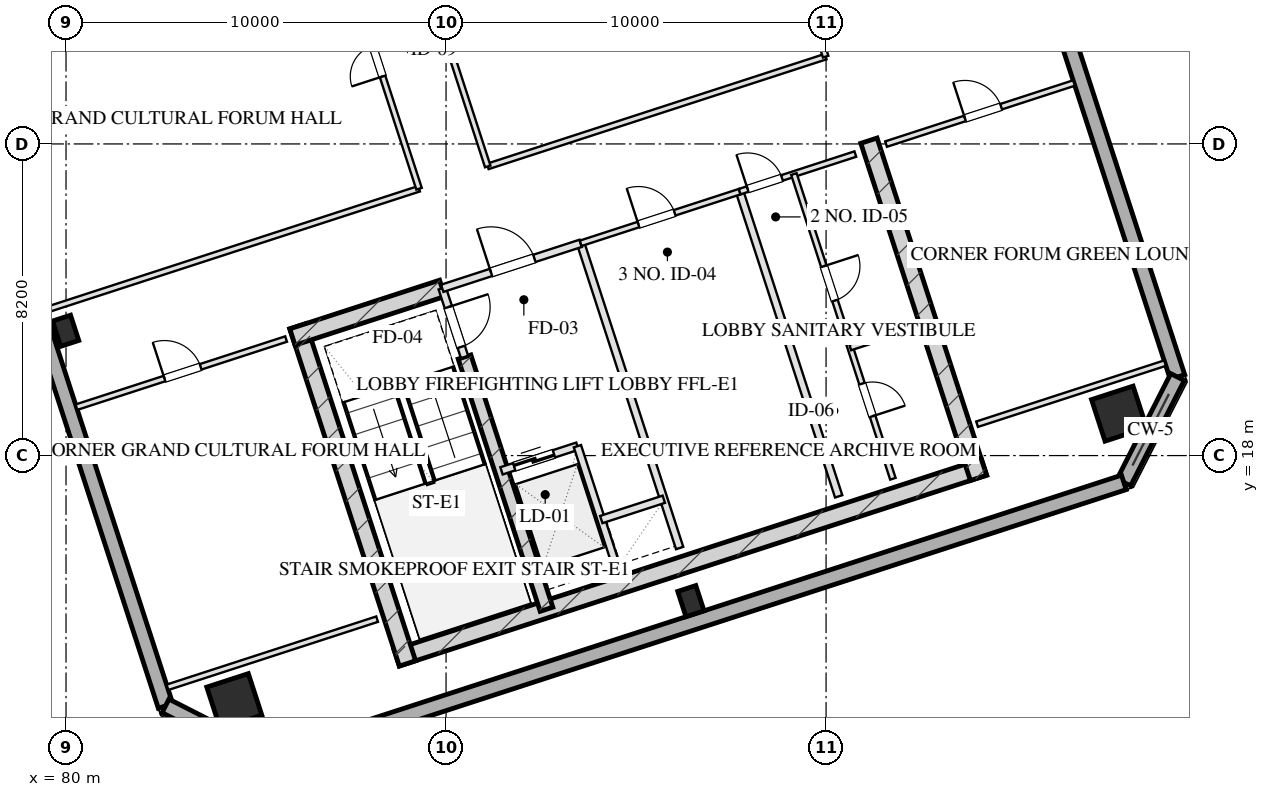
"""IFC4 building model, lengths in metres.
Left out: names, types, materials, properties, quantities, classifications, styles, units other than length and angle.
Written with IfcOpenShell. Run it as: python <this file> out.ifc"""

import sys

from ifc_helpers import new_model, si_unit, direction, frame, frame_2d, origin, origin_2d, place, context, subcontext, project, spatial, rectangle, hollow_rectangle, extrude, element, fill, save


model = new_model("IFC4")
c1 = context("Model", 3, precision=1e-05, world=origin(), true_north=direction((0.0, 1.0)))
c2 = subcontext(c1, "Body", "Model", "MODEL_VIEW")
j1 = project(units=[si_unit("LENGTHUNIT", "METRE"), si_unit("PLANEANGLEUNIT", "RADIAN")], contexts=[c1])
p1 = place(None, origin())
s1 = spatial("IfcSite", under=j1, at=p1, CompositionType="ELEMENT")
p2 = place(p1, origin())
s2 = spatial("IfcBuilding", under=s1, at=p2, CompositionType="ELEMENT")
p3 = place(p2, frame((0.0, 0.0, 202.4)))
s3 = spatial("IfcBuildingStorey", under=s2, at=p3, CompositionType="ELEMENT", Elevation=202.4)
p4 = place(p3, frame((88.701, 12.675, 0.0), z_axis=(0.0, 0.0, 1.0), x_axis=(0.95105824505, 0.309011673763, 0.0)))
e1 = element("IfcWall", 1, at=p4, inside=s3, PredefinedType="SHEAR", context=c2, shape_type="SweptSolid", body=[
    extrude(rectangle(XDim=16.25, YDim=0.45, at=frame_2d((8.125, 0.0))), origin(), (0.0, 0.0, 1.0), 3.45),
])
for number, where, z_axis, x_axis in (
    (2, (86.102, 21.404, 0.0), (0.0, 0.0, 1.0), (0.309, -0.951, 0.0)),
    (3, (101.128, 26.286, 0.0), (0.0, 0.0, 1.0), (0.309, -0.951, 0.0)),
):
    element("IfcWall", number, at=place(p3, frame(where, z_axis=z_axis, x_axis=x_axis)), inside=s3, PredefinedType="SHEAR", context=c2, shape_type="SweptSolid", body=[
        extrude(rectangle(XDim=9.33, YDim=0.45, at=frame_2d((4.665, 0.0))), origin(), (0.0, 0.0, 1.0), 3.45),
    ])
p5 = place(p3, frame((90.486, 20.594, 0.0), z_axis=(0.0, 0.0, 1.0), x_axis=(0.309020428229, -0.951055400562, 0.0)))
e4 = element("IfcWall", 4, at=p5, inside=s3, PredefinedType="SHEAR", context=c2, shape_type="SweptSolid", body=[
    extrude(rectangle(XDim=6.98, YDim=0.35, at=frame_2d((3.49, 0.0))), origin(), (0.0, 0.0, 1.0), 3.45),
])
p6 = place(p3, frame((85.957, 21.12, 0.0), z_axis=(0.0, 0.0, 1.0), x_axis=(0.951064796122, 0.308991510526, 0.0)))
e5 = element("IfcWall", 5, at=p6, inside=s3, PredefinedType="SHEAR", context=c2, shape_type="SweptSolid", body=[
    extrude(rectangle(XDim=4.145, YDim=0.45, at=frame_2d((2.073, 0.0))), origin(), (0.0, 0.0, 1.0), 3.45),
])
for number, where, z_axis, x_axis in (
    (6, (84.428, 11.539, 0.0), (0.0, 0.0, 1.0), (0.951, 0.309, 0.0)),
    (7, (107.71, 19.104, 0.0), (0.0, 0.0, 1.0), (0.951, 0.309, 0.0)),
):
    element("IfcColumn", number, at=place(p3, frame(where, z_axis=z_axis, x_axis=x_axis)), inside=s3, PredefinedType="COLUMN", context=c2, shape_type="SweptSolid", body=[
        extrude(hollow_rectangle(XDim=1.15, YDim=1.15, WallThickness=0.04, at=origin_2d()), origin(), (0.0, 0.0, 1.0), 3.451),
    ])
for number, where, z_axis, x_axis in (
    (8, (79.99, 21.284, 0.0), (0.0, 0.0, 1.0), (0.951, 0.309, 0.0)),
    (9, (96.443, 14.17, 0.0), (0.0, 0.0, 1.0), (0.951, 0.309, 0.0)),
):
    element("IfcColumn", number, at=place(p3, frame(where, z_axis=z_axis, x_axis=x_axis)), inside=s3, PredefinedType="COLUMN", context=c2, shape_type="SweptSolid", body=[
        extrude(hollow_rectangle(XDim=0.5, YDim=0.7, WallThickness=0.025, at=origin_2d()), origin(), (0.0, 0.0, 1.0), 3.451),
    ])
p7 = place(p3, frame((82.618, 11.414, 0.0), z_axis=(0.0, 0.0, 1.0), x_axis=(-0.309016491071, 0.951056679828, 0.0)))
e10 = element("IfcWall", 10, at=p7, inside=s3, PredefinedType="SOLIDWALL", context=c2, shape_type="SweptSolid", body=[
    extrude(rectangle(XDim=38.4, YDim=0.4, at=frame_2d((19.2, 0.0))), origin(), (0.0, 0.0, 1.0), 2.61),
])
p8 = place(p7, frame((11.75, 0.0, 0.75)))
e11 = element("IfcOpeningElement", 11, at=p8, cuts=e10, PredefinedType="OPENING", context=c2, shape_type="SweptSolid", body=[
    extrude(rectangle(XDim=2.1, YDim=1.46, at=frame_2d((1.05, 0.73))), frame((0.0, 0.21, 0.0), z_axis=(0.0, -1.0, 0.0), x_axis=(1.0, 0.0, 0.0)), (0.0, 0.0, 1.0), 0.42),
])
p9 = place(p7, frame((15.55, 0.0, 0.75)))
e12 = element("IfcOpeningElement", 12, at=p9, cuts=e10, PredefinedType="OPENING", context=c2, shape_type="SweptSolid", body=[
    extrude(rectangle(XDim=2.1, YDim=1.46, at=frame_2d((1.05, 0.73))), frame((0.0, 0.21, 0.0), z_axis=(0.0, -1.0, 0.0), x_axis=(1.0, 0.0, 0.0)), (0.0, 0.0, 1.0), 0.42),
])
p10 = place(p7, frame((20.75, 0.0, 0.75)))
e13 = element("IfcOpeningElement", 13, at=p10, cuts=e10, PredefinedType="OPENING", context=c2, shape_type="SweptSolid", body=[
    extrude(rectangle(XDim=2.1, YDim=1.46, at=frame_2d((1.05, 0.73))), frame((0.0, 0.21, 0.0), z_axis=(0.0, -1.0, 0.0), x_axis=(1.0, 0.0, 0.0)), (0.0, 0.0, 1.0), 0.42),
])
p11 = place(p7, frame((24.55, 0.0, 0.75)))
e14 = element("IfcOpeningElement", 14, at=p11, cuts=e10, PredefinedType="OPENING", context=c2, shape_type="SweptSolid", body=[
    extrude(rectangle(XDim=2.1, YDim=1.46, at=frame_2d((1.05, 0.73))), frame((0.0, 0.21, 0.0), z_axis=(0.0, -1.0, 0.0), x_axis=(1.0, 0.0, 0.0)), (0.0, 0.0, 1.0), 0.42),
])
p12 = place(p3, frame((97.382, 56.586, 0.0), z_axis=(0.0, 0.0, 1.0), x_axis=(0.309016491071, -0.951056679828, 0.0)))
e15 = element("IfcWall", 15, at=p12, inside=s3, PredefinedType="SOLIDWALL", context=c2, shape_type="SweptSolid", body=[
    extrude(rectangle(XDim=38.4, YDim=0.4, at=frame_2d((19.2, 0.0))), origin(), (0.0, 0.0, 1.0), 2.61),
])
p13 = place(p12, frame((24.55, 0.0, 0.75)))
e16 = element("IfcOpeningElement", 16, at=p13, cuts=e15, PredefinedType="OPENING", context=c2, shape_type="SweptSolid", body=[
    extrude(rectangle(XDim=2.1, YDim=1.46, at=frame_2d((1.05, 0.73))), frame((0.0, 0.21, 0.0), z_axis=(0.0, -1.0, 0.0), x_axis=(1.0, 0.0, 0.0)), (0.0, 0.0, 1.0), 0.42),
])
p14 = place(p12, frame((20.75, 0.0, 0.75)))
e17 = element("IfcOpeningElement", 17, at=p14, cuts=e15, PredefinedType="OPENING", context=c2, shape_type="SweptSolid", body=[
    extrude(rectangle(XDim=2.1, YDim=1.46, at=frame_2d((1.05, 0.73))), frame((0.0, 0.21, 0.0), z_axis=(0.0, -1.0, 0.0), x_axis=(1.0, 0.0, 0.0)), (0.0, 0.0, 1.0), 0.42),
])
p15 = place(p12, frame((15.55, 0.0, 0.75)))
e18 = element("IfcOpeningElement", 18, at=p15, cuts=e15, PredefinedType="OPENING", context=c2, shape_type="SweptSolid", body=[
    extrude(rectangle(XDim=2.1, YDim=1.46, at=frame_2d((1.05, 0.73))), frame((0.0, 0.21, 0.0), z_axis=(0.0, -1.0, 0.0), x_axis=(1.0, 0.0, 0.0)), (0.0, 0.0, 1.0), 0.42),
])
p16 = place(p12, frame((11.75, 0.0, 0.75)))
e19 = element("IfcOpeningElement", 19, at=p16, cuts=e15, PredefinedType="OPENING", context=c2, shape_type="SweptSolid", body=[
    extrude(rectangle(XDim=2.1, YDim=1.46, at=frame_2d((1.05, 0.73))), frame((0.0, 0.21, 0.0), z_axis=(0.0, -1.0, 0.0), x_axis=(1.0, 0.0, 0.0)), (0.0, 0.0, 1.0), 0.42),
])
p17 = place(p3, frame((109.248, 20.066, 0.0), z_axis=(0.0, 0.0, 1.0), x_axis=(-0.453949291228, -0.891027519774, 0.0)))
e20 = element("IfcWall", 20, at=p17, inside=s3, PredefinedType="SOLIDWALL", context=c2, shape_type="SweptSolid", body=[
    extrude(rectangle(XDim=3.111, YDim=0.4, at=frame_2d((1.556, 0.0))), origin(), (0.0, 0.0, 1.0), 2.61),
])
p18 = place(p3, frame((107.835, 17.294, 0.0), z_axis=(0.0, 0.0, 1.0), x_axis=(-0.951058012937, -0.309012388148, 0.0)))
e21 = element("IfcWall", 21, at=p18, inside=s3, PredefinedType="SOLIDWALL", context=c2, shape_type="SweptSolid", body=[
    extrude(rectangle(XDim=23.6, YDim=0.4, at=frame_2d((11.8, 0.0))), origin(), (0.0, 0.0, 1.0), 2.61),
])
p19 = place(p3, frame((85.39, 10.001, 0.0), z_axis=(0.0, 0.0, 1.0), x_axis=(-0.890979603174, 0.454043331334, 0.0)))
e22 = element("IfcWall", 22, at=p19, inside=s3, PredefinedType="SOLIDWALL", context=c2, shape_type="SweptSolid", body=[
    extrude(rectangle(XDim=3.111, YDim=0.4, at=frame_2d((1.556, 0.0))), origin(), (0.0, 0.0, 1.0), 2.61),
])
p20 = place(p3, frame((89.899, 22.401, 0.0), z_axis=(0.0, 0.0, 1.0), x_axis=(0.308932062672, -0.951084108086, 0.0)))
e23 = element("IfcWall", 23, at=p20, inside=s3, PredefinedType="PARTITIONING", context=c2, shape_type="SweptSolid", body=[
    extrude(rectangle(XDim=1.9, YDim=0.2, at=frame_2d((0.95, 0.0))), origin(), (0.0, 0.0, 1.0), 3.175),
])
p21 = place(p20, frame((0.52, 0.0, 0.0)))
e24 = element("IfcOpeningElement", 24, at=p21, cuts=e23, PredefinedType="OPENING", context=c2, shape_type="SweptSolid", body=[
    extrude(rectangle(XDim=1.1, YDim=2.05, at=frame_2d((0.55, 1.025))), frame((0.0, 0.11, 0.0), z_axis=(0.0, -1.0, 0.0), x_axis=(1.0, 0.0, 0.0)), (0.0, 0.0, 1.0), 0.22),
])
p22 = place(p3, frame((93.542, 23.585, 0.0), z_axis=(0.0, 0.0, 1.0), x_axis=(0.309042196757, -0.951048327176, 0.0)))
e25 = element("IfcWall", 25, at=p22, inside=s3, PredefinedType="PARTITIONING", context=c2, shape_type="SweptSolid", body=[
    extrude(rectangle(XDim=8.43, YDim=0.2, at=frame_2d((4.215, 0.0))), origin(), (0.0, 0.0, 1.0), 3.175),
])
p23 = place(p3, frame((89.899, 22.401, 0.0), z_axis=(0.0, 0.0, 1.0), x_axis=(0.951046716504, 0.309047153403, 0.0)))
e26 = element("IfcWall", 26, at=p23, inside=s3, PredefinedType="PARTITIONING", context=c2, shape_type="SweptSolid", body=[
    extrude(rectangle(XDim=3.83, YDim=0.2, at=frame_2d((1.915, 0.0))), origin(), (0.0, 0.0, 1.0), 3.175),
])
p24 = place(p23, frame((1.35, 0.0, 0.0)))
e27 = element("IfcOpeningElement", 27, at=p24, cuts=e26, PredefinedType="OPENING", context=c2, shape_type="SweptSolid", body=[
    extrude(rectangle(XDim=1.2, YDim=2.05, at=frame_2d((0.6, 1.025))), frame((0.0, 0.11, 0.0), z_axis=(0.0, -1.0, 0.0), x_axis=(1.0, 0.0, 0.0)), (0.0, 0.0, 1.0), 0.22),
])
p25 = place(p3, frame((91.46, 17.598, 0.0), z_axis=(0.0, 0.0, 1.0), x_axis=(0.951062257173, 0.308999325213, 0.0)))
e28 = element("IfcWall", 28, at=p25, inside=s3, PredefinedType="PARTITIONING", context=c2, shape_type="SweptSolid", body=[
    extrude(rectangle(XDim=2.1, YDim=0.2, at=frame_2d((1.05, 0.0))), origin(), (0.0, 0.0, 1.0), 3.175),
])
p26 = place(p25, frame((0.35, 0.0, 0.0)))
e29 = element("IfcOpeningElement", 29, at=p26, cuts=e28, PredefinedType="OPENING", context=c2, shape_type="SweptSolid", body=[
    extrude(rectangle(XDim=1.1, YDim=2.05, at=frame_2d((0.55, 1.025))), frame((0.0, 0.11, 0.0), z_axis=(0.0, -1.0, 0.0), x_axis=(1.0, 0.0, 0.0)), (0.0, 0.0, 1.0), 0.22),
])
p27 = place(p3, frame((93.457, 18.247, 0.0), z_axis=(0.0, 0.0, 1.0), x_axis=(0.3089935693, -0.951064127245, 0.0)))
e30 = element("IfcWall", 30, at=p27, inside=s3, PredefinedType="PARTITIONING", context=c2, shape_type="SweptSolid", body=[
    extrude(rectangle(XDim=3.7, YDim=0.2, at=frame_2d((1.85, 0.0))), origin(), (0.0, 0.0, 1.0), 3.175),
])
p28 = place(p3, frame((94.084, 16.317, 0.0), z_axis=(0.0, 0.0, 1.0), x_axis=(0.951041328149, 0.309063734775, 0.0)))
e31 = element("IfcWall", 31, at=p28, inside=s3, PredefinedType="PARTITIONING", context=c2, shape_type="SweptSolid", body=[
    extrude(rectangle(XDim=1.73, YDim=0.2, at=frame_2d((0.865, 0.0))), origin(), (0.0, 0.0, 1.0), 3.175),
])
p29 = place(p3, frame((97.727, 24.944, 0.0), z_axis=(0.0, 0.0, 1.0), x_axis=(0.309016001439, -0.951056838919, 0.0)))
e32 = element("IfcWall", 32, at=p29, inside=s3, PredefinedType="PARTITIONING", context=c2, shape_type="SweptSolid", body=[
    extrude(rectangle(XDim=8.43, YDim=0.2, at=frame_2d((4.215, 0.0))), origin(), (0.0, 0.0, 1.0), 3.175),
])
p30 = place(p3, frame((93.542, 23.585, 0.0), z_axis=(0.0, 0.0, 1.0), x_axis=(0.951063829732, 0.308994485023, 0.0)))
e33 = element("IfcWall", 33, at=p30, inside=s3, PredefinedType="PARTITIONING", context=c2, shape_type="SweptSolid", body=[
    extrude(rectangle(XDim=4.4, YDim=0.15, at=frame_2d((2.2, 0.0))), origin(), (0.0, 0.0, 1.0), 3.175),
])
p31 = place(p30, frame((1.6, 0.0, 0.0)))
e34 = element("IfcOpeningElement", 34, at=p31, cuts=e33, PredefinedType="OPENING", context=c2, shape_type="SweptSolid", body=[
    extrude(rectangle(XDim=1.0, YDim=2.05, at=frame_2d((0.5, 1.025))), frame((0.0, 0.085, 0.0), z_axis=(0.0, -1.0, 0.0), x_axis=(1.0, 0.0, 0.0)), (0.0, 0.0, 1.0), 0.17),
])
p32 = place(p3, frame((97.727, 24.944, 0.0), z_axis=(0.0, 0.0, 1.0), x_axis=(0.951036872128, 0.309077446369, 0.0)))
e35 = element("IfcWall", 35, at=p32, inside=s3, PredefinedType="PARTITIONING", context=c2, shape_type="SweptSolid", body=[
    extrude(rectangle(XDim=3.2, YDim=0.15, at=frame_2d((1.6, 0.0))), origin(), (0.0, 0.0, 1.0), 3.175),
])
p33 = place(p32, frame((0.22, 0.0, 0.0)))
e36 = element("IfcOpeningElement", 36, at=p33, cuts=e35, PredefinedType="OPENING", context=c2, shape_type="SweptSolid", body=[
    extrude(rectangle(XDim=0.95, YDim=2.05, at=frame_2d((0.475, 1.025))), frame((0.0, 0.085, 0.0), z_axis=(0.0, -1.0, 0.0), x_axis=(1.0, 0.0, 0.0)), (0.0, 0.0, 1.0), 0.17),
])
p34 = place(p3, frame((99.153, 25.408, 0.0), z_axis=(0.0, 0.0, 1.0), x_axis=(0.309016001439, -0.951056838919, 0.0)))
e37 = element("IfcWall", 37, at=p34, inside=s3, PredefinedType="PARTITIONING", context=c2, shape_type="SweptSolid", body=[
    extrude(rectangle(XDim=8.43, YDim=0.15, at=frame_2d((4.215, 0.0))), origin(), (0.0, 0.0, 1.0), 3.175),
])
p35 = place(p34, frame((2.55, 0.0, 0.0)))
e38 = element("IfcOpeningElement", 38, at=p35, cuts=e37, PredefinedType="OPENING", context=c2, shape_type="SweptSolid", body=[
    extrude(rectangle(XDim=0.95, YDim=2.05, at=frame_2d((0.475, 1.025))), frame((0.0, 0.085, 0.0), z_axis=(0.0, -1.0, 0.0), x_axis=(1.0, 0.0, 0.0)), (0.0, 0.0, 1.0), 0.17),
])
p36 = place(p34, frame((5.8, 0.0, 0.0)))
e39 = element("IfcOpeningElement", 39, at=p36, cuts=e37, PredefinedType="OPENING", context=c2, shape_type="SweptSolid", body=[
    extrude(rectangle(XDim=0.9, YDim=2.05, at=frame_2d((0.45, 1.025))), frame((0.0, 0.085, 0.0), z_axis=(0.0, -1.0, 0.0), x_axis=(1.0, 0.0, 0.0)), (0.0, 0.0, 1.0), 0.17),
])
p37 = place(p3, frame((100.636, 20.843, 0.0), z_axis=(0.0, 0.0, 1.0), x_axis=(0.951040401051, 0.309066587596, 0.0)))
e40 = element("IfcWall", 40, at=p37, inside=s3, PredefinedType="PARTITIONING", context=c2, shape_type="SweptSolid", body=[
    extrude(rectangle(XDim=1.7, YDim=0.15, at=frame_2d((0.85, 0.0))), origin(), (0.0, 0.0, 1.0), 3.175),
])
p38 = place(p3, frame((82.669, 11.903, 0.0), z_axis=(0.0, 0.0, 1.0), x_axis=(0.951059431056, 0.309008023519, 0.0)))
e41 = element("IfcWall", 41, at=p38, inside=s3, PredefinedType="PARTITIONING", context=c2, shape_type="SweptSolid", body=[
    extrude(rectangle(XDim=5.8, YDim=0.15, at=frame_2d((2.9, 0.0))), origin(), (0.0, 0.0, 1.0), 3.175),
])
p39 = place(p3, frame((80.275, 19.274, 0.0), z_axis=(0.0, 0.0, 1.0), x_axis=(0.951059431056, 0.309008023519, 0.0)))
e42 = element("IfcWall", 42, at=p39, inside=s3, PredefinedType="PARTITIONING", context=c2, shape_type="SweptSolid", body=[
    extrude(rectangle(XDim=5.8, YDim=0.15, at=frame_2d((2.9, 0.0))), origin(), (0.0, 0.0, 1.0), 3.175),
])
p40 = place(p39, frame((2.436, 0.0, 0.0)))
e43 = element("IfcOpeningElement", 43, at=p40, cuts=e42, PredefinedType="OPENING", context=c2, shape_type="SweptSolid", body=[
    extrude(rectangle(XDim=1.0, YDim=2.05, at=frame_2d((0.5, 1.025))), frame((0.0, 0.085, 0.0), z_axis=(0.0, -1.0, 0.0), x_axis=(1.0, 0.0, 0.0)), (0.0, 0.0, 1.0), 0.17),
])
p41 = place(p3, frame((103.973, 18.825, 0.0), z_axis=(0.0, 0.0, 1.0), x_axis=(0.951055112834, 0.309021313752, 0.0)))
e44 = element("IfcWall", 44, at=p41, inside=s3, PredefinedType="PARTITIONING", context=c2, shape_type="SweptSolid", body=[
    extrude(rectangle(XDim=5.2, YDim=0.15, at=frame_2d((2.6, 0.0))), origin(), (0.0, 0.0, 1.0), 3.175),
])
p42 = place(p3, frame((101.578, 26.196, 0.0), z_axis=(0.0, 0.0, 1.0), x_axis=(0.951064427824, 0.308992644131, 0.0)))
e45 = element("IfcWall", 45, at=p42, inside=s3, PredefinedType="PARTITIONING", context=c2, shape_type="SweptSolid", body=[
    extrude(rectangle(XDim=5.2, YDim=0.15, at=frame_2d((2.6, 0.0))), origin(), (0.0, 0.0, 1.0), 3.175),
])
p43 = place(p42, frame((2.184, 0.0, 0.0)))
e46 = element("IfcOpeningElement", 46, at=p43, cuts=e45, PredefinedType="OPENING", context=c2, shape_type="SweptSolid", body=[
    extrude(rectangle(XDim=1.0, YDim=2.05, at=frame_2d((0.5, 1.025))), frame((0.0, 0.085, 0.0), z_axis=(0.0, -1.0, 0.0), x_axis=(1.0, 0.0, 0.0)), (0.0, 0.0, 1.0), 0.17),
])
p44 = place(p3, frame((79.447, 21.823, 0.0), z_axis=(0.0, 0.0, 1.0), x_axis=(0.951057294912, 0.309014598029, 0.0)))
e47 = element("IfcWall", 47, at=p44, inside=s3, PredefinedType="PARTITIONING", context=c2, shape_type="SweptSolid", body=[
    extrude(rectangle(XDim=10.35, YDim=0.15, at=frame_2d((5.175, 0.0))), origin(), (0.0, 0.0, 1.0), 3.175),
])
p45 = place(p3, frame((91.097, 25.608, 0.0), z_axis=(0.0, 0.0, 1.0), x_axis=(0.951053063704, 0.309027620156, 0.0)))
e48 = element("IfcWall", 48, at=p45, inside=s3, PredefinedType="PARTITIONING", context=c2, shape_type="SweptSolid", body=[
    extrude(rectangle(XDim=9.35, YDim=0.15, at=frame_2d((4.675, 0.0))), origin(), (0.0, 0.0, 1.0), 3.175),
])
p46 = place(p3, frame((89.29, 25.021, 0.0), z_axis=(0.0, 0.0, 1.0), x_axis=(-0.309004459387, 0.951060589068, 0.0)))
e49 = element("IfcWall", 49, at=p46, inside=s3, PredefinedType="PARTITIONING", context=c2, shape_type="SweptSolid", body=[
    extrude(rectangle(XDim=16.64, YDim=0.15, at=frame_2d((8.32, 0.0))), origin(), (0.0, 0.0, 1.0), 3.175),
])
p47 = place(p46, frame((3.107, 0.0, 0.0)))
e50 = element("IfcOpeningElement", 50, at=p47, cuts=e49, PredefinedType="OPENING", context=c2, shape_type="SweptSolid", body=[
    extrude(rectangle(XDim=0.85, YDim=2.05, at=frame_2d((0.425, 1.025))), frame((0.0, 0.085, 0.0), z_axis=(0.0, -1.0, 0.0), x_axis=(1.0, 0.0, 0.0)), (0.0, 0.0, 1.0), 0.17),
])
p48 = place(p46, frame((11.427, 0.0, 0.0)))
e51 = element("IfcOpeningElement", 51, at=p48, cuts=e49, PredefinedType="OPENING", context=c2, shape_type="SweptSolid", body=[
    extrude(rectangle(XDim=1.0, YDim=2.05, at=frame_2d((0.5, 1.025))), frame((0.0, 0.085, 0.0), z_axis=(0.0, -1.0, 0.0), x_axis=(1.0, 0.0, 0.0)), (0.0, 0.0, 1.0), 0.17),
])
p49 = place(p3, frame((91.097, 25.608, 0.0), z_axis=(0.0, 0.0, 1.0), x_axis=(-0.30901773025, 0.951056277195, 0.0)))
e52 = element("IfcWall", 52, at=p49, inside=s3, PredefinedType="PARTITIONING", context=c2, shape_type="SweptSolid", body=[
    extrude(rectangle(XDim=16.64, YDim=0.15, at=frame_2d((8.32, 0.0))), origin(), (0.0, 0.0, 1.0), 3.175),
])
p50 = place(p49, frame((7.987, 0.0, 0.0)))
e53 = element("IfcOpeningElement", 53, at=p50, cuts=e52, PredefinedType="OPENING", context=c2, shape_type="SweptSolid", body=[
    extrude(rectangle(XDim=1.1, YDim=2.05, at=frame_2d((0.55, 1.025))), frame((0.0, 0.085, 0.0), z_axis=(0.0, -1.0, 0.0), x_axis=(1.0, 0.0, 0.0)), (0.0, 0.0, 1.0), 0.17),
])
p51 = place(p3, frame((99.989, 28.498, 0.0), z_axis=(0.0, 0.0, 1.0), x_axis=(-0.30901773025, 0.951056277195, 0.0)))
e54 = element("IfcWall", 54, at=p51, inside=s3, PredefinedType="PARTITIONING", context=c2, shape_type="SweptSolid", body=[
    extrude(rectangle(XDim=16.64, YDim=0.15, at=frame_2d((8.32, 0.0))), origin(), (0.0, 0.0, 1.0), 3.175),
])
p52 = place(p21, origin())
e55 = element("IfcDoor", 55, at=p52, inside=s3, OperationType="SINGLE_SWING_LEFT", PredefinedType="DOOR", context=c2, shape_type="SweptSolid", body=[
    extrude(rectangle(XDim=1.1, YDim=2.05, at=frame_2d((0.55, 1.025))), frame((0.0, 0.025, 0.0), z_axis=(0.0, -1.0, 0.0), x_axis=(1.0, 0.0, 0.0)), (0.0, 0.0, 1.0), 0.05),
])
fill(e24, e55)
p53 = place(p24, origin())
e56 = element("IfcDoor", 56, at=p53, inside=s3, OperationType="SINGLE_SWING_LEFT", PredefinedType="DOOR", context=c2, shape_type="SweptSolid", body=[
    extrude(rectangle(XDim=1.2, YDim=2.05, at=frame_2d((0.6, 1.025))), frame((0.0, 0.025, 0.0), z_axis=(0.0, -1.0, 0.0), x_axis=(1.0, 0.0, 0.0)), (0.0, 0.0, 1.0), 0.05),
])
fill(e27, e56)
p54 = place(p26, origin())
e57 = element("IfcDoor", 57, at=p54, inside=s3, OperationType="DOUBLE_DOOR_SLIDING", PredefinedType="DOOR", context=c2, shape_type="SweptSolid", body=[
    extrude(rectangle(XDim=1.1, YDim=2.05, at=frame_2d((0.55, 1.025))), frame((0.0, 0.025, 0.0), z_axis=(0.0, -1.0, 0.0), x_axis=(1.0, 0.0, 0.0)), (0.0, 0.0, 1.0), 0.05),
])
fill(e29, e57)
p55 = place(p31, origin())
e58 = element("IfcDoor", 58, at=p55, inside=s3, OperationType="SINGLE_SWING_LEFT", PredefinedType="DOOR", context=c2, shape_type="SweptSolid", body=[
    extrude(rectangle(XDim=1.0, YDim=2.05, at=frame_2d((0.5, 1.025))), frame((0.0, 0.025, 0.0), z_axis=(0.0, -1.0, 0.0), x_axis=(1.0, 0.0, 0.0)), (0.0, 0.0, 1.0), 0.05),
])
fill(e34, e58)
p56 = place(p33, origin())
e59 = element("IfcDoor", 59, at=p56, inside=s3, OperationType="SINGLE_SWING_LEFT", PredefinedType="DOOR", context=c2, shape_type="SweptSolid", body=[
    extrude(rectangle(XDim=0.95, YDim=2.05, at=frame_2d((0.475, 1.025))), frame((0.0, 0.025, 0.0), z_axis=(0.0, -1.0, 0.0), x_axis=(1.0, 0.0, 0.0)), (0.0, 0.0, 1.0), 0.05),
])
fill(e36, e59)
p57 = place(p35, origin())
e60 = element("IfcDoor", 60, at=p57, inside=s3, OperationType="SINGLE_SWING_LEFT", PredefinedType="DOOR", context=c2, shape_type="SweptSolid", body=[
    extrude(rectangle(XDim=0.95, YDim=2.05, at=frame_2d((0.475, 1.025))), frame((0.0, 0.025, 0.0), z_axis=(0.0, -1.0, 0.0), x_axis=(1.0, 0.0, 0.0)), (0.0, 0.0, 1.0), 0.05),
])
fill(e38, e60)
p58 = place(p36, origin())
e61 = element("IfcDoor", 61, at=p58, inside=s3, OperationType="SINGLE_SWING_RIGHT", PredefinedType="DOOR", context=c2, shape_type="SweptSolid", body=[
    extrude(rectangle(XDim=0.9, YDim=2.05, at=frame_2d((0.45, 1.025))), frame((0.0, 0.025, 0.0), z_axis=(0.0, -1.0, 0.0), x_axis=(1.0, 0.0, 0.0)), (0.0, 0.0, 1.0), 0.05),
])
fill(e39, e61)
p59 = place(p40, origin())
e62 = element("IfcDoor", 62, at=p59, inside=s3, OperationType="SINGLE_SWING_LEFT", PredefinedType="DOOR", context=c2, shape_type="SweptSolid", body=[
    extrude(rectangle(XDim=1.0, YDim=2.05, at=frame_2d((0.5, 1.025))), frame((0.0, 0.025, 0.0), z_axis=(0.0, -1.0, 0.0), x_axis=(1.0, 0.0, 0.0)), (0.0, 0.0, 1.0), 0.05),
])
fill(e43, e62)
p60 = place(p43, origin())
e63 = element("IfcDoor", 63, at=p60, inside=s3, OperationType="SINGLE_SWING_LEFT", PredefinedType="DOOR", context=c2, shape_type="SweptSolid", body=[
    extrude(rectangle(XDim=1.0, YDim=2.05, at=frame_2d((0.5, 1.025))), frame((0.0, 0.025, 0.0), z_axis=(0.0, -1.0, 0.0), x_axis=(1.0, 0.0, 0.0)), (0.0, 0.0, 1.0), 0.05),
])
fill(e46, e63)
p61 = place(p47, origin())
e64 = element("IfcDoor", 64, at=p61, inside=s3, OperationType="SINGLE_SWING_LEFT", PredefinedType="DOOR", context=c2, shape_type="SweptSolid", body=[
    extrude(rectangle(XDim=0.85, YDim=2.05, at=frame_2d((0.425, 1.025))), frame((0.0, 0.025, 0.0), z_axis=(0.0, -1.0, 0.0), x_axis=(1.0, 0.0, 0.0)), (0.0, 0.0, 1.0), 0.05),
])
fill(e50, e64)
save(model, sys.argv[1])
